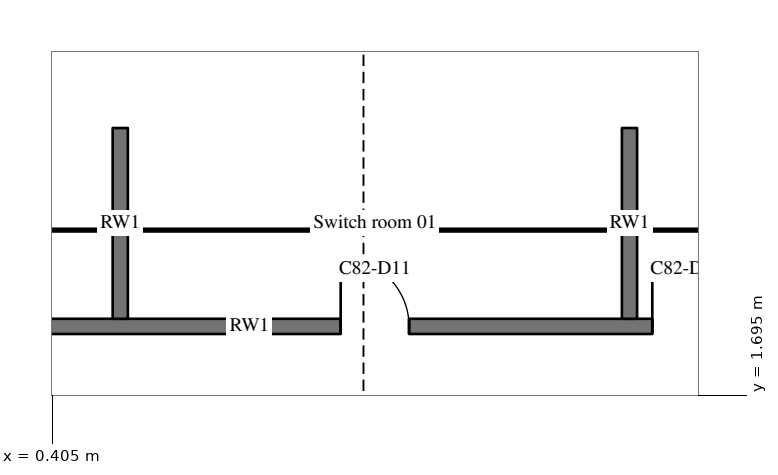
"""IFC4 building model, lengths in metres.
Left out: names, types, materials, properties, quantities, classifications, styles, units other than length and angle.
Written with IfcOpenShell. Run it as: python <this file> out.ifc"""

import sys

from ifc_helpers import new_model, si_unit, direction, frame, frame_2d, origin, place, context, subcontext, project, spatial, rectangle, extrude, element, fill, save


model = new_model("IFC4")
c1 = context("Model", 3, precision=1e-05, world=origin(), true_north=direction((0.0, 1.0)))
c2 = subcontext(c1, "Body", "Model", "MODEL_VIEW")
j1 = project(units=[si_unit("LENGTHUNIT", "METRE"), si_unit("PLANEANGLEUNIT", "RADIAN")], contexts=[c1])
p1 = place(None, origin())
s1 = spatial("IfcSite", under=j1, at=p1, CompositionType="ELEMENT")
p2 = place(p1, origin())
s2 = spatial("IfcBuilding", under=s1, at=p2, CompositionType="ELEMENT")
p3 = place(p2, frame((0.0, 0.0, 304.5)))
s3 = spatial("IfcBuildingStorey", under=s2, at=p3, CompositionType="ELEMENT", Elevation=304.5)
p4 = place(p3, frame((-12.1, 2.6, 0.0), z_axis=(0.0, 0.0, 1.0), x_axis=(1.0, 0.0, 0.0)))
e1 = element("IfcWall", 1, at=p4, inside=s3, PredefinedType="SOLIDWALL", context=c2, shape_type="SweptSolid", body=[
    extrude(rectangle(XDim=30.2, YDim=0.2, at=frame_2d((15.1, 0.0))), origin(), (0.0, 0.0, 1.0), 2.66),
])
p5 = place(p4, frame((6.25, 0.0, 0.0)))
e2 = element("IfcOpeningElement", 2, at=p5, cuts=e1, PredefinedType="OPENING", context=c2, shape_type="SweptSolid", body=[
    extrude(rectangle(XDim=0.9, YDim=2.1, at=frame_2d((0.45, 1.05))), frame((0.0, 0.11, 0.0), z_axis=(0.0, -1.0, 0.0), x_axis=(1.0, 0.0, 0.0)), (0.0, 0.0, 1.0), 0.22),
])
p6 = place(p4, frame((16.3, 0.0, 0.0)))
e3 = element("IfcOpeningElement", 3, at=p6, cuts=e1, PredefinedType="OPENING", context=c2, shape_type="SweptSolid", body=[
    extrude(rectangle(XDim=0.9, YDim=2.1, at=frame_2d((0.45, 1.05))), frame((0.0, 0.11, 0.0), z_axis=(0.0, -1.0, 0.0), x_axis=(1.0, 0.0, 0.0)), (0.0, 0.0, 1.0), 0.22),
])
p7 = place(p4, frame((20.4, 0.0, 0.0)))
e4 = element("IfcOpeningElement", 4, at=p7, cuts=e1, PredefinedType="OPENING", context=c2, shape_type="SweptSolid", body=[
    extrude(rectangle(XDim=0.9, YDim=2.1, at=frame_2d((0.45, 1.05))), frame((0.0, 0.11, 0.0), z_axis=(0.0, -1.0, 0.0), x_axis=(1.0, 0.0, 0.0)), (0.0, 0.0, 1.0), 0.22),
])
for number, where, z_axis, x_axis in (
    (5, (1.3, 2.7, 0.0), (0.0, 0.0, 1.0), (0.0, 1.0, 0.0)),
    (6, (8.0, 2.7, 0.0), (0.0, 0.0, 1.0), (0.0, 1.0, 0.0)),
):
    element("IfcWall", number, at=place(p3, frame(where, z_axis=z_axis, x_axis=x_axis)), inside=s3, PredefinedType="SOLIDWALL", context=c2, shape_type="SweptSolid", body=[
        extrude(rectangle(XDim=2.51, YDim=0.2, at=frame_2d((1.255, 0.0))), origin(), (0.0, 0.0, 1.0), 2.66),
    ])
p8 = place(p6, origin())
e7 = element("IfcDoor", 7, at=p8, inside=s3, OperationType="SINGLE_SWING_LEFT", PredefinedType="DOOR", context=c2, shape_type="SweptSolid", body=[
    extrude(rectangle(XDim=0.9, YDim=2.1, at=frame_2d((0.45, 1.05))), frame((0.0, 0.025, 0.0), z_axis=(0.0, -1.0, 0.0), x_axis=(1.0, 0.0, 0.0)), (0.0, 0.0, 1.0), 0.05),
])
fill(e3, e7)
p9 = place(p7, origin())
e8 = element("IfcDoor", 8, at=p9, inside=s3, OperationType="SINGLE_SWING_LEFT", PredefinedType="DOOR", context=c2, shape_type="SweptSolid", body=[
    extrude(rectangle(XDim=0.9, YDim=2.1, at=frame_2d((0.45, 1.05))), frame((0.0, 0.025, 0.0), z_axis=(0.0, -1.0, 0.0), x_axis=(1.0, 0.0, 0.0)), (0.0, 0.0, 1.0), 0.05),
])
fill(e4, e8)
save(model, sys.argv[1])
